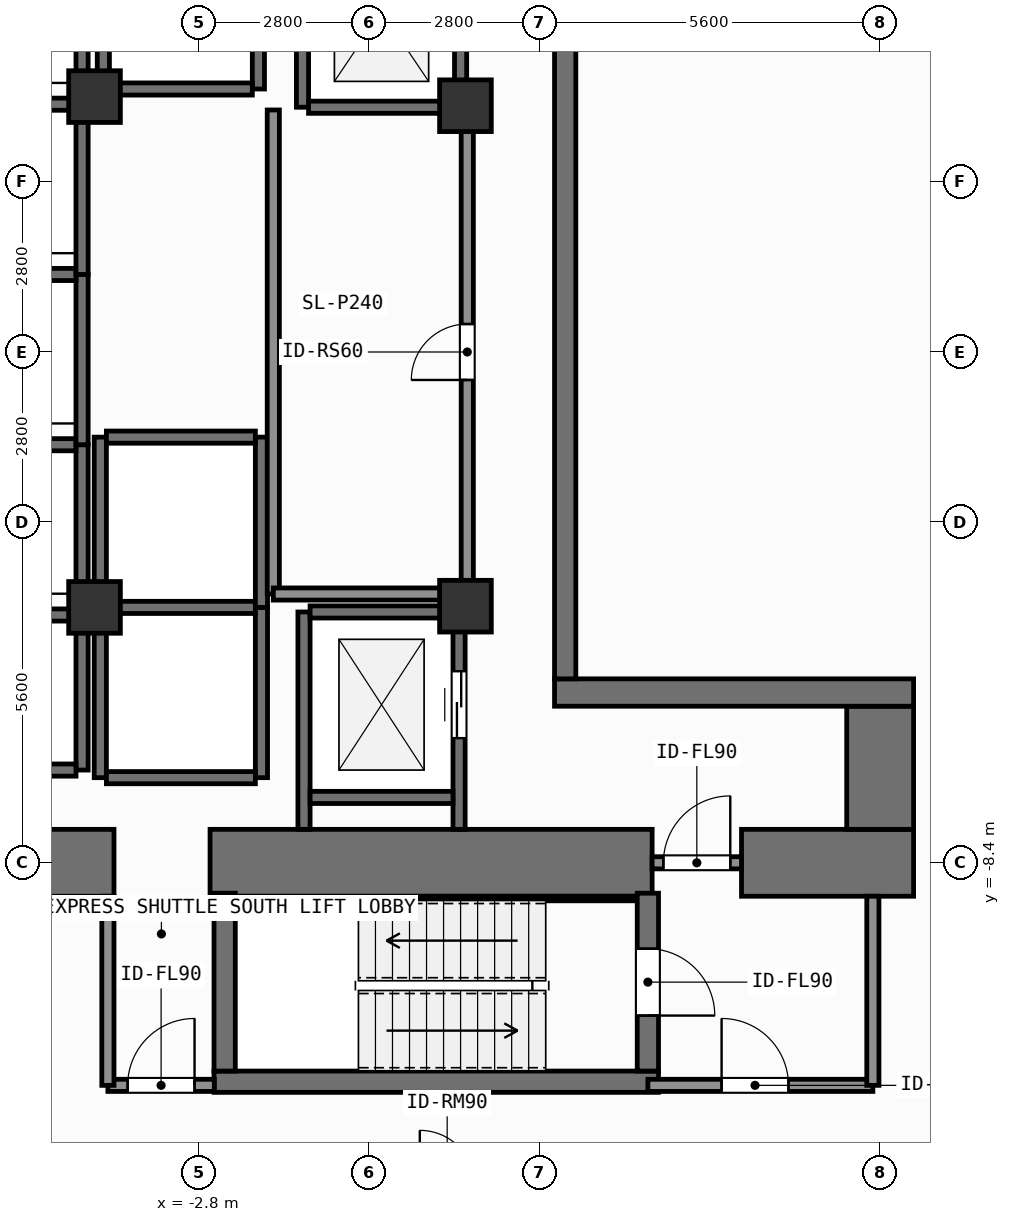
"""IFC4 building model, lengths in metres.
Left out: names, types, materials, properties, quantities, classifications, styles, units other than length and angle.
Written with IfcOpenShell. Run it as: python <this file> out.ifc"""

import sys

from ifc_helpers import new_model, si_unit, direction, frame, frame_2d, origin, origin_2d, place, context, subcontext, project, spatial, rectangle, extrude, element, fill, save


model = new_model("IFC4")
c1 = context("Model", 3, precision=1e-05, world=origin(), true_north=direction((0.0, 1.0)))
c2 = subcontext(c1, "Body", "Model", "MODEL_VIEW")
j1 = project(units=[si_unit("LENGTHUNIT", "METRE"), si_unit("PLANEANGLEUNIT", "RADIAN")], contexts=[c1])
p1 = place(None, origin())
s1 = spatial("IfcSite", under=j1, at=p1, CompositionType="ELEMENT")
p2 = place(p1, origin())
s2 = spatial("IfcBuilding", under=s1, at=p2, CompositionType="ELEMENT")
p3 = place(p2, frame((0.0, 0.0, 13.2)))
s3 = spatial("IfcBuildingStorey", under=s2, at=p3, CompositionType="ELEMENT", Elevation=13.2)
p4 = place(p3, frame((-7.55, -8.4, 0.0), z_axis=(0.0, 0.0, 1.0), x_axis=(1.0, 0.0, 0.0)))
e1 = element("IfcWall", 1, at=p4, inside=s3, PredefinedType="SHEAR", context=c2, shape_type="SweptSolid", body=[
    extrude(rectangle(XDim=3.35, YDim=1.1, at=frame_2d((1.675, 0.0))), origin(), (0.0, 0.0, 1.0), 4.2),
])
p5 = place(p3, frame((-2.62, -8.4, 0.0), z_axis=(0.0, 0.0, 1.0), x_axis=(1.0, 0.0, 0.0)))
e2 = element("IfcWall", 2, at=p5, inside=s3, PredefinedType="SHEAR", context=c2, shape_type="SweptSolid", body=[
    extrude(rectangle(XDim=7.27, YDim=1.1, at=frame_2d((3.635, 0.0))), origin(), (0.0, 0.0, 1.0), 4.2),
])
p6 = place(p3, frame((6.12, -8.4, 0.0), z_axis=(0.0, 0.0, 1.0), x_axis=(1.0, 0.0, 0.0)))
e3 = element("IfcWall", 3, at=p6, inside=s3, PredefinedType="SHEAR", context=c2, shape_type="SweptSolid", body=[
    extrude(rectangle(XDim=2.83, YDim=1.1, at=frame_2d((1.415, 0.0))), origin(), (0.0, 0.0, 1.0), 4.2),
])
p7 = place(p3, frame((8.4, -7.85, 0.0), z_axis=(0.0, 0.0, 1.0), x_axis=(0.0, 1.0, 0.0)))
e4 = element("IfcWall", 4, at=p7, inside=s3, PredefinedType="SHEAR", context=c2, shape_type="SweptSolid", body=[
    extrude(rectangle(XDim=2.025, YDim=1.1, at=frame_2d((1.013, 0.0))), origin(), (0.0, 0.0, 1.0), 4.2),
])
p8 = place(p3, frame((3.045, -5.6, 0.0), z_axis=(0.0, 0.0, 1.0), x_axis=(1.0, 0.0, 0.0)))
e5 = element("IfcWall", 5, at=p8, inside=s3, PredefinedType="SHEAR", context=c2, shape_type="SweptSolid", body=[
    extrude(rectangle(XDim=5.905, YDim=0.45, at=frame_2d((2.953, 0.0))), origin(), (0.0, 0.0, 1.0), 4.2),
])
p9 = place(p3, frame((3.22, -5.375, 0.0), z_axis=(0.0, 0.0, 1.0), x_axis=(0.0, 1.0, 0.0)))
e6 = element("IfcWall", 6, at=p9, inside=s3, PredefinedType="SHEAR", context=c2, shape_type="SweptSolid", body=[
    extrude(rectangle(XDim=10.75, YDim=0.35, at=frame_2d((5.375, 0.0))), origin(), (0.0, 0.0, 1.0), 4.2),
])
p10 = place(p3, frame((-2.555, -12.0, 0.0), z_axis=(0.0, 0.0, 1.0), x_axis=(1.0, 0.0, 0.0)))
e7 = element("IfcWall", 7, at=p10, inside=s3, PredefinedType="SHEAR", context=c2, shape_type="SweptSolid", body=[
    extrude(rectangle(XDim=7.31, YDim=0.35, at=frame_2d((3.655, 0.0))), origin(), (0.0, 0.0, 1.0), 4.2),
])
p11 = place(p3, frame((-2.2, -8.988, 0.0), z_axis=(0.0, 0.0, 1.0), x_axis=(1.0, 0.0, 0.0)))
e8 = element("IfcWall", 8, at=p11, inside=s3, PredefinedType="SHEAR", context=c2, shape_type="SweptSolid", body=[
    extrude(rectangle(XDim=6.6, YDim=0.075, at=frame_2d((3.3, 0.0))), origin(), (0.0, 0.0, 1.0), 4.2),
])
p12 = place(p3, frame((-2.38, -11.825, 0.0), z_axis=(0.0, 0.0, 1.0), x_axis=(0.0, 1.0, 0.0)))
e9 = element("IfcWall", 9, at=p12, inside=s3, PredefinedType="SHEAR", context=c2, shape_type="SweptSolid", body=[
    extrude(rectangle(XDim=2.925, YDim=0.35, at=frame_2d((1.462, 0.0))), origin(), (0.0, 0.0, 1.0), 4.2),
])
p13 = place(p3, frame((4.58, -8.9, 0.0), z_axis=(0.0, 0.0, 1.0), x_axis=(0.0, -1.0, 0.0)))
e10 = element("IfcWall", 10, at=p13, inside=s3, PredefinedType="SHEAR", context=c2, shape_type="SweptSolid", body=[
    extrude(rectangle(XDim=2.925, YDim=0.35, at=frame_2d((1.462, 0.0))), origin(), (0.0, 0.0, 1.0), 4.2),
])
p14 = place(p13, frame((0.913, 0.0, 0.0)))
e11 = element("IfcOpeningElement", 11, at=p14, cuts=e10, PredefinedType="OPENING", context=c2, shape_type="SweptSolid", body=[
    extrude(rectangle(XDim=1.1, YDim=2.15, at=frame_2d((0.55, 1.075))), frame((0.0, 0.185, 0.0), z_axis=(0.0, -1.0, 0.0), x_axis=(1.0, 0.0, 0.0)), (0.0, 0.0, 1.0), 0.37),
])
for number, where, z_axis, x_axis in (
    (12, (-4.52, -4.2, 0.0), (0.0, 0.0, 1.0), (1.0, 0.0, 0.0)),
    (13, (1.58, -4.18, 0.0), (0.0, 0.0, 1.0), (1.0, 0.0, 0.0)),
    (14, (1.58, 4.05, 0.0), (0.0, 0.0, 1.0), (1.0, 0.0, 0.0)),
    (15, (-4.52, 4.2, 0.0), (0.0, 0.0, 1.0), (1.0, 0.0, 0.0)),
):
    element("IfcColumn", number, at=place(p3, frame(where, z_axis=z_axis, x_axis=x_axis)), inside=s3, PredefinedType="COLUMN", context=c2, shape_type="SweptSolid", body=[
        extrude(rectangle(XDim=0.85, YDim=0.85, at=origin_2d()), origin(), (0.0, 0.0, 1.0), 4.2),
    ])
p15 = place(p3, frame((-4.725, -6.875, 0.0), z_axis=(0.0, 0.0, 1.0), x_axis=(0.0, 1.0, 0.0)))
e16 = element("IfcWall", 16, at=p15, inside=s3, PredefinedType="SHEAR", context=c2, shape_type="SweptSolid", body=[
    extrude(rectangle(XDim=2.55, YDim=0.2, at=frame_2d((1.275, 0.0))), origin(), (0.0, 0.0, 1.0), 3.96),
])
for number, where, z_axis, x_axis in (
    (17, (-7.175, -6.875, 0.0), (0.0, 0.0, 1.0), (1.0, 0.0, 0.0)),
    (18, (-7.175, -4.325, 0.0), (0.0, 0.0, 1.0), (1.0, 0.0, 0.0)),
):
    element("IfcWall", number, at=place(p3, frame(where, z_axis=z_axis, x_axis=x_axis)), inside=s3, PredefinedType="SHEAR", context=c2, shape_type="SweptSolid", body=[
        extrude(rectangle(XDim=2.35, YDim=0.2, at=frame_2d((1.175, 0.0))), origin(), (0.0, 0.0, 1.0), 3.96),
    ])
p16 = place(p3, frame((-4.725, -4.325, 0.0), z_axis=(0.0, 0.0, 1.0), x_axis=(0.0, 1.0, 0.0)))
e19 = element("IfcWall", 19, at=p16, inside=s3, PredefinedType="SHEAR", context=c2, shape_type="SweptSolid", body=[
    extrude(rectangle(XDim=2.8, YDim=0.2, at=frame_2d((1.4, 0.0))), origin(), (0.0, 0.0, 1.0), 3.96),
])
p17 = place(p3, frame((-7.175, -1.525, 0.0), z_axis=(0.0, 0.0, 1.0), x_axis=(1.0, 0.0, 0.0)))
e20 = element("IfcWall", 20, at=p17, inside=s3, PredefinedType="SHEAR", context=c2, shape_type="SweptSolid", body=[
    extrude(rectangle(XDim=2.35, YDim=0.2, at=frame_2d((1.175, 0.0))), origin(), (0.0, 0.0, 1.0), 3.96),
])
p18 = place(p3, frame((-4.725, -1.525, 0.0), z_axis=(0.0, 0.0, 1.0), x_axis=(0.0, 1.0, 0.0)))
e21 = element("IfcWall", 21, at=p18, inside=s3, PredefinedType="SHEAR", context=c2, shape_type="SweptSolid", body=[
    extrude(rectangle(XDim=2.8, YDim=0.2, at=frame_2d((1.4, 0.0))), origin(), (0.0, 0.0, 1.0), 3.96),
])
p19 = place(p3, frame((-7.175, 1.275, 0.0), z_axis=(0.0, 0.0, 1.0), x_axis=(1.0, 0.0, 0.0)))
e22 = element("IfcWall", 22, at=p19, inside=s3, PredefinedType="SHEAR", context=c2, shape_type="SweptSolid", body=[
    extrude(rectangle(XDim=2.35, YDim=0.2, at=frame_2d((1.175, 0.0))), origin(), (0.0, 0.0, 1.0), 3.96),
])
p20 = place(p3, frame((-4.725, 1.275, 0.0), z_axis=(0.0, 0.0, 1.0), x_axis=(0.0, 1.0, 0.0)))
e23 = element("IfcWall", 23, at=p20, inside=s3, PredefinedType="SHEAR", context=c2, shape_type="SweptSolid", body=[
    extrude(rectangle(XDim=2.8, YDim=0.2, at=frame_2d((1.4, 0.0))), origin(), (0.0, 0.0, 1.0), 3.96),
])
p21 = place(p3, frame((-7.175, 4.075, 0.0), z_axis=(0.0, 0.0, 1.0), x_axis=(1.0, 0.0, 0.0)))
e24 = element("IfcWall", 24, at=p21, inside=s3, PredefinedType="SHEAR", context=c2, shape_type="SweptSolid", body=[
    extrude(rectangle(XDim=2.35, YDim=0.2, at=frame_2d((1.175, 0.0))), origin(), (0.0, 0.0, 1.0), 3.96),
])
p22 = place(p3, frame((-4.725, 4.075, 0.0), z_axis=(0.0, 0.0, 1.0), x_axis=(0.0, 1.0, 0.0)))
e25 = element("IfcWall", 25, at=p22, inside=s3, PredefinedType="SHEAR", context=c2, shape_type="SweptSolid", body=[
    extrude(rectangle(XDim=2.8, YDim=0.2, at=frame_2d((1.4, 0.0))), origin(), (0.0, 0.0, 1.0), 3.96),
])
for number, where, z_axis, x_axis in (
    (26, (-4.375, 4.325, 0.0), (0.0, 0.0, 1.0), (0.0, 1.0, 0.0)),
    (27, (-1.825, 4.325, 0.0), (0.0, 0.0, 1.0), (0.0, 1.0, 0.0)),
):
    element("IfcWall", number, at=place(p3, frame(where, z_axis=z_axis, x_axis=x_axis)), inside=s3, PredefinedType="SHEAR", context=c2, shape_type="SweptSolid", body=[
        extrude(rectangle(XDim=2.55, YDim=0.2, at=frame_2d((1.275, 0.0))), origin(), (0.0, 0.0, 1.0), 3.96),
    ])
p23 = place(p3, frame((-4.275, 4.325, 0.0), z_axis=(0.0, 0.0, 1.0), x_axis=(1.0, 0.0, 0.0)))
e28 = element("IfcWall", 28, at=p23, inside=s3, PredefinedType="SHEAR", context=c2, shape_type="SweptSolid", body=[
    extrude(rectangle(XDim=2.35, YDim=0.2, at=frame_2d((1.175, 0.0))), origin(), (0.0, 0.0, 1.0), 3.96),
])
for number, where, z_axis, x_axis in (
    (29, (-4.425, -7.0, 0.0), (0.0, 0.0, 1.0), (0.0, 1.0, 0.0)),
    (30, (-1.775, -7.0, 0.0), (0.0, 0.0, 1.0), (0.0, 1.0, 0.0)),
):
    element("IfcWall", number, at=place(p3, frame(where, z_axis=z_axis, x_axis=x_axis)), inside=s3, PredefinedType="SHEAR", context=c2, shape_type="SweptSolid", body=[
        extrude(rectangle(XDim=2.8, YDim=0.2, at=frame_2d((1.4, 0.0))), origin(), (0.0, 0.0, 1.0), 3.96),
    ])
for number, where, z_axis, x_axis in (
    (31, (-4.325, -7.0, 0.0), (0.0, 0.0, 1.0), (1.0, 0.0, 0.0)),
    (32, (-4.325, -4.2, 0.0), (0.0, 0.0, 1.0), (1.0, 0.0, 0.0)),
):
    element("IfcWall", number, at=place(p3, frame(where, z_axis=z_axis, x_axis=x_axis)), inside=s3, PredefinedType="SHEAR", context=c2, shape_type="SweptSolid", body=[
        extrude(rectangle(XDim=2.45, YDim=0.2, at=frame_2d((1.225, 0.0))), origin(), (0.0, 0.0, 1.0), 3.96),
    ])
for number, where, z_axis, x_axis in (
    (33, (-4.425, -4.2, 0.0), (0.0, 0.0, 1.0), (0.0, 1.0, 0.0)),
    (34, (-1.775, -4.2, 0.0), (0.0, 0.0, 1.0), (0.0, 1.0, 0.0)),
):
    element("IfcWall", number, at=place(p3, frame(where, z_axis=z_axis, x_axis=x_axis)), inside=s3, PredefinedType="SHEAR", context=c2, shape_type="SweptSolid", body=[
        extrude(rectangle(XDim=2.8, YDim=0.2, at=frame_2d((1.4, 0.0))), origin(), (0.0, 0.0, 1.0), 3.96),
    ])
p24 = place(p3, frame((-4.325, -1.4, 0.0), z_axis=(0.0, 0.0, 1.0), x_axis=(1.0, 0.0, 0.0)))
e35 = element("IfcWall", 35, at=p24, inside=s3, PredefinedType="SHEAR", context=c2, shape_type="SweptSolid", body=[
    extrude(rectangle(XDim=2.45, YDim=0.2, at=frame_2d((1.225, 0.0))), origin(), (0.0, 0.0, 1.0), 3.96),
])
p25 = place(p3, frame((-1.1, 4.025, 0.0), z_axis=(0.0, 0.0, 1.0), x_axis=(0.0, 1.0, 0.0)))
e36 = element("IfcWall", 36, at=p25, inside=s3, PredefinedType="SHEAR", context=c2, shape_type="SweptSolid", body=[
    extrude(rectangle(XDim=3.15, YDim=0.2, at=frame_2d((1.575, 0.0))), origin(), (0.0, 0.0, 1.0), 3.96),
])
p26 = place(p3, frame((1.5, 4.025, 0.0), z_axis=(0.0, 0.0, 1.0), x_axis=(0.0, 1.0, 0.0)))
e37 = element("IfcWall", 37, at=p26, inside=s3, PredefinedType="SHEAR", context=c2, shape_type="SweptSolid", body=[
    extrude(rectangle(XDim=3.15, YDim=0.2, at=frame_2d((1.575, 0.0))), origin(), (0.0, 0.0, 1.0), 3.96),
])
p27 = place(p26, frame((1.025, 0.0, 0.0)))
e38 = element("IfcOpeningElement", 38, at=p27, cuts=e37, PredefinedType="OPENING", context=c2, shape_type="SweptSolid", body=[
    extrude(rectangle(XDim=1.1, YDim=2.2, at=frame_2d((0.55, 1.1))), frame((0.0, 0.11, 0.0), z_axis=(0.0, -1.0, 0.0), x_axis=(1.0, 0.0, 0.0)), (0.0, 0.0, 1.0), 0.22),
])
p28 = place(p3, frame((-1.0, 4.025, 0.0), z_axis=(0.0, 0.0, 1.0), x_axis=(1.0, 0.0, 0.0)))
e39 = element("IfcWall", 39, at=p28, inside=s3, PredefinedType="SHEAR", context=c2, shape_type="SweptSolid", body=[
    extrude(rectangle(XDim=2.4, YDim=0.2, at=frame_2d((1.2, 0.0))), origin(), (0.0, 0.0, 1.0), 3.96),
])
p29 = place(p3, frame((-1.075, -7.85, 0.0), z_axis=(0.0, 0.0, 1.0), x_axis=(0.0, 1.0, 0.0)))
e40 = element("IfcWall", 40, at=p29, inside=s3, PredefinedType="SHEAR", context=c2, shape_type="SweptSolid", body=[
    extrude(rectangle(XDim=3.575, YDim=0.2, at=frame_2d((1.788, 0.0))), origin(), (0.0, 0.0, 1.0), 3.96),
])
p30 = place(p3, frame((1.475, -7.85, 0.0), z_axis=(0.0, 0.0, 1.0), x_axis=(0.0, 1.0, 0.0)))
e41 = element("IfcWall", 41, at=p30, inside=s3, PredefinedType="SHEAR", context=c2, shape_type="SweptSolid", body=[
    extrude(rectangle(XDim=3.575, YDim=0.2, at=frame_2d((1.788, 0.0))), origin(), (0.0, 0.0, 1.0), 3.96),
])
p31 = place(p30, frame((1.5, 0.0, 0.0)))
e42 = element("IfcOpeningElement", 42, at=p31, cuts=e41, PredefinedType="OPENING", context=c2, shape_type="SweptSolid", body=[
    extrude(rectangle(XDim=1.1, YDim=2.2, at=frame_2d((0.55, 1.1))), frame((0.0, 0.11, 0.0), z_axis=(0.0, -1.0, 0.0), x_axis=(1.0, 0.0, 0.0)), (0.0, 0.0, 1.0), 0.22),
])
for number, where, z_axis, x_axis in (
    (43, (-0.975, -7.325, 0.0), (0.0, 0.0, 1.0), (1.0, 0.0, 0.0)),
    (44, (-0.975, -4.275, 0.0), (0.0, 0.0, 1.0), (1.0, 0.0, 0.0)),
):
    element("IfcWall", number, at=place(p3, frame(where, z_axis=z_axis, x_axis=x_axis)), inside=s3, PredefinedType="SHEAR", context=c2, shape_type="SweptSolid", body=[
        extrude(rectangle(XDim=2.35, YDim=0.2, at=frame_2d((1.175, 0.0))), origin(), (0.0, 0.0, 1.0), 3.96),
    ])
p32 = place(p3, frame((4.58, -12.06, 0.0), z_axis=(0.0, 0.0, 1.0), x_axis=(1.0, 0.0, 0.0)))
e45 = element("IfcWall", 45, at=p32, inside=s3, PredefinedType="SOLIDWALL", context=c2, shape_type="SweptSolid", body=[
    extrude(rectangle(XDim=3.7, YDim=0.2, at=frame_2d((1.85, 0.0))), origin(), (0.0, 0.0, 1.0), 3.96),
])
p33 = place(p32, frame((1.212, 0.0, 0.0)))
e46 = element("IfcOpeningElement", 46, at=p33, cuts=e45, PredefinedType="OPENING", context=c2, shape_type="SweptSolid", body=[
    extrude(rectangle(XDim=1.1, YDim=2.15, at=frame_2d((0.55, 1.075))), frame((0.0, 0.11, 0.0), z_axis=(0.0, -1.0, 0.0), x_axis=(1.0, 0.0, 0.0)), (0.0, 0.0, 1.0), 0.22),
])
p34 = place(p3, frame((4.65, -8.4, 0.0), z_axis=(0.0, 0.0, 1.0), x_axis=(1.0, 0.0, 0.0)))
e47 = element("IfcWall", 47, at=p34, inside=s3, PredefinedType="SOLIDWALL", context=c2, shape_type="SweptSolid", body=[
    extrude(rectangle(XDim=1.47, YDim=0.2, at=frame_2d((0.735, 0.0))), origin(), (0.0, 0.0, 1.0), 3.0),
])
p35 = place(p34, frame((0.185, 0.0, 0.0)))
e48 = element("IfcOpeningElement", 48, at=p35, cuts=e47, PredefinedType="OPENING", context=c2, shape_type="SweptSolid", body=[
    extrude(rectangle(XDim=1.1, YDim=2.15, at=frame_2d((0.55, 1.075))), frame((0.0, 0.11, 0.0), z_axis=(0.0, -1.0, 0.0), x_axis=(1.0, 0.0, 0.0)), (0.0, 0.0, 1.0), 0.22),
])
p36 = place(p3, frame((-4.3, -12.06, 0.0), z_axis=(0.0, 0.0, 1.0), x_axis=(1.0, 0.0, 0.0)))
e49 = element("IfcWall", 49, at=p36, inside=s3, PredefinedType="SOLIDWALL", context=c2, shape_type="SweptSolid", body=[
    extrude(rectangle(XDim=1.75, YDim=0.2, at=frame_2d((0.875, 0.0))), origin(), (0.0, 0.0, 1.0), 3.96),
])
p37 = place(p36, frame((0.325, 0.0, 0.0)))
e50 = element("IfcOpeningElement", 50, at=p37, cuts=e49, PredefinedType="OPENING", context=c2, shape_type="SweptSolid", body=[
    extrude(rectangle(XDim=1.1, YDim=2.15, at=frame_2d((0.55, 1.075))), frame((0.0, 0.11, 0.0), z_axis=(0.0, -1.0, 0.0), x_axis=(1.0, 0.0, 0.0)), (0.0, 0.0, 1.0), 0.22),
])
p38 = place(p3, frame((1.61, -3.98, 0.0), z_axis=(0.0, 0.0, 1.0), x_axis=(0.0, 1.0, 0.0)))
e51 = element("IfcWall", 51, at=p38, inside=s3, PredefinedType="SOLIDWALL", context=c2, shape_type="SweptSolid", body=[
    extrude(rectangle(XDim=7.96, YDim=0.2, at=frame_2d((3.98, 0.0))), origin(), (0.0, 0.0, 1.0), 3.96),
])
p39 = place(p38, frame((3.52, 0.0, 0.0)))
e52 = element("IfcOpeningElement", 52, at=p39, cuts=e51, PredefinedType="OPENING", context=c2, shape_type="SweptSolid", body=[
    extrude(rectangle(XDim=0.92, YDim=2.1, at=frame_2d((0.46, 1.05))), frame((0.0, 0.11, 0.0), z_axis=(0.0, -1.0, 0.0), x_axis=(1.0, 0.0, 0.0)), (0.0, 0.0, 1.0), 0.22),
])
for number, where, z_axis, x_axis in (
    (53, (8.28, -12.06, 0.0), (0.0, 0.0, 1.0), (0.0, 1.0, 0.0)),
    (54, (-4.3, -12.06, 0.0), (0.0, 0.0, 1.0), (0.0, 1.0, 0.0)),
):
    element("IfcWall", number, at=place(p3, frame(where, z_axis=z_axis, x_axis=x_axis)), inside=s3, PredefinedType="SOLIDWALL", context=c2, shape_type="SweptSolid", body=[
        extrude(rectangle(XDim=3.11, YDim=0.2, at=frame_2d((1.555, 0.0))), origin(), (0.0, 0.0, 1.0), 3.96),
    ])
p40 = place(p3, frame((-1.58, -3.98, 0.0), z_axis=(0.0, 0.0, 1.0), x_axis=(0.0, 1.0, 0.0)))
e55 = element("IfcWall", 55, at=p40, inside=s3, PredefinedType="SOLIDWALL", context=c2, shape_type="SweptSolid", body=[
    extrude(rectangle(XDim=7.96, YDim=0.2, at=frame_2d((3.98, 0.0))), origin(), (0.0, 0.0, 1.0), 3.96),
])
p41 = place(p3, frame((-1.58, -3.98, 0.0), z_axis=(0.0, 0.0, 1.0), x_axis=(1.0, 0.0, 0.0)))
e56 = element("IfcWall", 56, at=p41, inside=s3, PredefinedType="SOLIDWALL", context=c2, shape_type="SweptSolid", body=[
    extrude(rectangle(XDim=3.19, YDim=0.2, at=frame_2d((1.595, 0.0))), origin(), (0.0, 0.0, 1.0), 3.96),
])
p42 = place(p31, origin())
e57 = element("IfcDoor", 57, at=p42, inside=s3, OperationType="SLIDING_TO_LEFT", PredefinedType="DOOR", context=c2, shape_type="SweptSolid", body=[
    extrude(rectangle(XDim=1.1, YDim=2.2, at=frame_2d((0.55, 1.1))), frame((0.0, 0.025, 0.0), z_axis=(0.0, -1.0, 0.0), x_axis=(1.0, 0.0, 0.0)), (0.0, 0.0, 1.0), 0.05),
])
fill(e42, e57)
p43 = place(p14, origin())
e58 = element("IfcDoor", 58, at=p43, inside=s3, OperationType="SINGLE_SWING_RIGHT", PredefinedType="DOOR", context=c2, shape_type="SweptSolid", body=[
    extrude(rectangle(XDim=1.1, YDim=2.15, at=frame_2d((0.55, 1.075))), frame((0.0, 0.025, 0.0), z_axis=(0.0, -1.0, 0.0), x_axis=(1.0, 0.0, 0.0)), (0.0, 0.0, 1.0), 0.05),
])
fill(e11, e58)
p44 = place(p33, origin())
e59 = element("IfcDoor", 59, at=p44, inside=s3, OperationType="SINGLE_SWING_LEFT", PredefinedType="DOOR", context=c2, shape_type="SweptSolid", body=[
    extrude(rectangle(XDim=1.1, YDim=2.15, at=frame_2d((0.55, 1.075))), frame((0.0, 0.025, 0.0), z_axis=(0.0, -1.0, 0.0), x_axis=(1.0, 0.0, 0.0)), (0.0, 0.0, 1.0), 0.05),
])
fill(e46, e59)
p45 = place(p35, origin())
e60 = element("IfcDoor", 60, at=p45, inside=s3, OperationType="SINGLE_SWING_RIGHT", PredefinedType="DOOR", context=c2, shape_type="SweptSolid", body=[
    extrude(rectangle(XDim=1.1, YDim=2.15, at=frame_2d((0.55, 1.075))), frame((0.0, 0.025, 0.0), z_axis=(0.0, -1.0, 0.0), x_axis=(1.0, 0.0, 0.0)), (0.0, 0.0, 1.0), 0.05),
])
fill(e48, e60)
p46 = place(p37, origin())
e61 = element("IfcDoor", 61, at=p46, inside=s3, OperationType="SINGLE_SWING_RIGHT", PredefinedType="DOOR", context=c2, shape_type="SweptSolid", body=[
    extrude(rectangle(XDim=1.1, YDim=2.15, at=frame_2d((0.55, 1.075))), frame((0.0, 0.025, 0.0), z_axis=(0.0, -1.0, 0.0), x_axis=(1.0, 0.0, 0.0)), (0.0, 0.0, 1.0), 0.05),
])
fill(e50, e61)
p47 = place(p39, origin())
e62 = element("IfcDoor", 62, at=p47, inside=s3, OperationType="SINGLE_SWING_LEFT", PredefinedType="DOOR", context=c2, shape_type="SweptSolid", body=[
    extrude(rectangle(XDim=0.92, YDim=2.1, at=frame_2d((0.46, 1.05))), frame((0.0, 0.025, 0.0), z_axis=(0.0, -1.0, 0.0), x_axis=(1.0, 0.0, 0.0)), (0.0, 0.0, 1.0), 0.05),
])
fill(e52, e62)
save(model, sys.argv[1])
